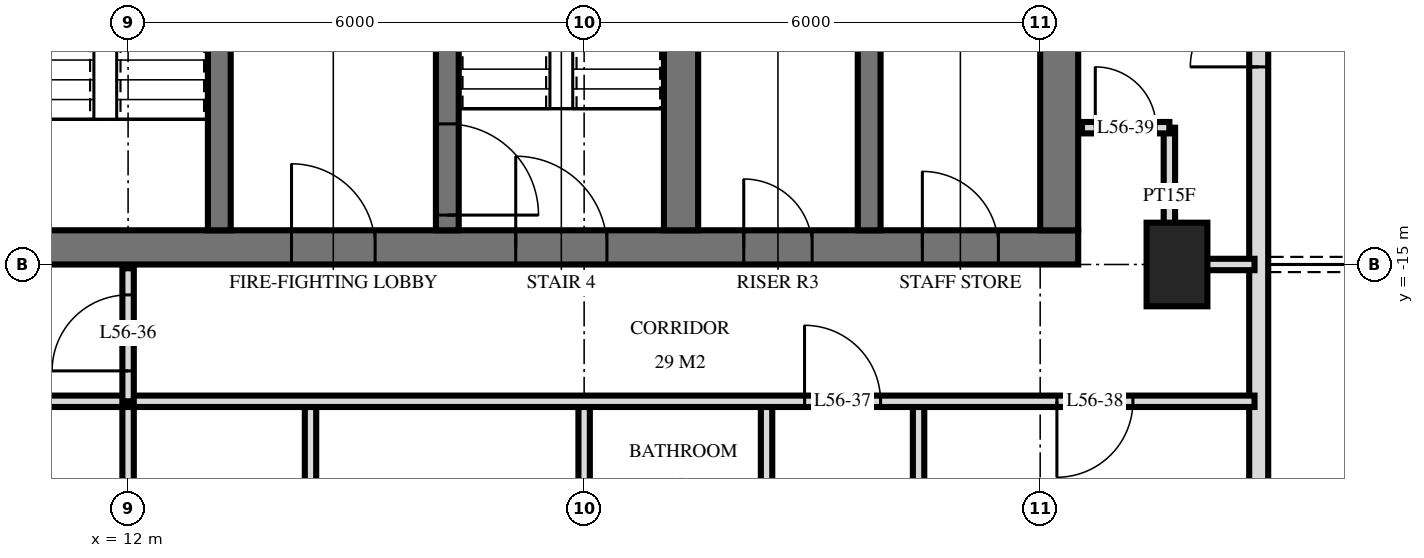
"""IFC4 building model, lengths in metres.
Left out: names, types, materials, properties, quantities, classifications, styles, units other than length and angle.
Written with IfcOpenShell. Run it as: python <this file> out.ifc"""

import sys

from ifc_helpers import new_model, si_unit, direction, frame, frame_2d, origin, origin_2d, place, context, subcontext, project, spatial, rectangle, extrude, element, fill, save


model = new_model("IFC4")
c1 = context("Model", 3, precision=1e-05, world=origin(), true_north=direction((0.0, 1.0)))
c2 = subcontext(c1, "Body", "Model", "MODEL_VIEW")
j1 = project(units=[si_unit("LENGTHUNIT", "METRE"), si_unit("PLANEANGLEUNIT", "RADIAN")], contexts=[c1])
p1 = place(None, origin())
s1 = spatial("IfcSite", under=j1, at=p1, CompositionType="ELEMENT")
p2 = place(p1, origin())
s2 = spatial("IfcBuilding", under=s1, at=p2, CompositionType="ELEMENT")
p3 = place(p2, frame((0.0, 0.0, 215.1)))
s3 = spatial("IfcBuildingStorey", under=s2, at=p3, CompositionType="ELEMENT", Elevation=215.1)
p4 = place(p3, frame((25.8, -15.0, 0.0), z_axis=(0.0, 0.0, 1.0), x_axis=(0.0, 1.0, 0.0)))
e1 = element("IfcColumn", 1, at=p4, inside=s3, PredefinedType="COLUMN", context=c2, shape_type="SweptSolid", body=[
    extrude(rectangle(XDim=1.1, YDim=0.8, at=origin_2d()), origin(), (0.0, 0.0, 1.0), 3.5),
])
p5 = place(p3, frame((10.0, -14.775, 0.0), z_axis=(0.0, 0.0, 1.0), x_axis=(1.0, 0.0, 0.0)))
e2 = element("IfcWall", 2, at=p5, inside=s3, PredefinedType="SHEAR", context=c2, shape_type="SweptSolid", body=[
    extrude(rectangle(XDim=14.5, YDim=0.45, at=frame_2d((7.25, 0.0))), origin(), (0.0, 0.0, 1.0), 3.5),
])
p6 = place(p5, frame((7.1, 0.0, 0.0)))
e3 = element("IfcOpeningElement", 3, at=p6, cuts=e2, PredefinedType="OPENING", context=c2, shape_type="SweptSolid", body=[
    extrude(rectangle(XDim=1.2, YDim=2.1, at=frame_2d((0.6, 1.05))), frame((0.0, 0.235, 0.0), z_axis=(0.0, -1.0, 0.0), x_axis=(1.0, 0.0, 0.0)), (0.0, 0.0, 1.0), 0.47),
])
p7 = place(p5, frame((4.15, 0.0, 0.0)))
e4 = element("IfcOpeningElement", 4, at=p7, cuts=e2, PredefinedType="OPENING", context=c2, shape_type="SweptSolid", body=[
    extrude(rectangle(XDim=1.1, YDim=2.1, at=frame_2d((0.55, 1.05))), frame((0.0, 0.235, 0.0), z_axis=(0.0, -1.0, 0.0), x_axis=(1.0, 0.0, 0.0)), (0.0, 0.0, 1.0), 0.47),
])
p8 = place(p5, frame((10.1, 0.0, 0.0)))
e5 = element("IfcOpeningElement", 5, at=p8, cuts=e2, PredefinedType="OPENING", context=c2, shape_type="SweptSolid", body=[
    extrude(rectangle(XDim=0.9, YDim=2.1, at=frame_2d((0.45, 1.05))), frame((0.0, 0.235, 0.0), z_axis=(0.0, -1.0, 0.0), x_axis=(1.0, 0.0, 0.0)), (0.0, 0.0, 1.0), 0.47),
])
p9 = place(p5, frame((12.45, 0.0, 0.0)))
e6 = element("IfcOpeningElement", 6, at=p9, cuts=e2, PredefinedType="OPENING", context=c2, shape_type="SweptSolid", body=[
    extrude(rectangle(XDim=1.0, YDim=2.1, at=frame_2d((0.5, 1.05))), frame((0.0, 0.235, 0.0), z_axis=(0.0, -1.0, 0.0), x_axis=(1.0, 0.0, 0.0)), (0.0, 0.0, 1.0), 0.47),
])
p10 = place(p3, frame((24.25, -14.55, 0.0), z_axis=(0.0, 0.0, 1.0), x_axis=(0.0, 1.0, 0.0)))
e7 = element("IfcWall", 7, at=p10, inside=s3, PredefinedType="SHEAR", context=c2, shape_type="SweptSolid", body=[
    extrude(rectangle(XDim=14.1, YDim=0.5, at=frame_2d((7.05, 0.0))), origin(), (0.0, 0.0, 1.0), 3.5),
])
p11 = place(p3, frame((13.2, -14.55, 0.0), z_axis=(0.0, 0.0, 1.0), x_axis=(0.0, 1.0, 0.0)))
e8 = element("IfcWall", 8, at=p11, inside=s3, PredefinedType="SHEAR", context=c2, shape_type="SweptSolid", body=[
    extrude(rectangle(XDim=5.4, YDim=0.3, at=frame_2d((2.7, 0.0))), origin(), (0.0, 0.0, 1.0), 3.5),
])
p12 = place(p11, frame((4.0, 0.0, 0.0)))
e9 = element("IfcOpeningElement", 9, at=p12, cuts=e8, PredefinedType="OPENING", context=c2, shape_type="SweptSolid", body=[
    extrude(rectangle(XDim=1.2, YDim=2.1, at=frame_2d((0.6, 1.05))), frame((0.0, 0.16, 0.0), z_axis=(0.0, -1.0, 0.0), x_axis=(1.0, 0.0, 0.0)), (0.0, 0.0, 1.0), 0.32),
])
p13 = place(p3, frame((16.2, -14.55, 0.0), z_axis=(0.0, 0.0, 1.0), x_axis=(0.0, 1.0, 0.0)))
e10 = element("IfcWall", 10, at=p13, inside=s3, PredefinedType="SHEAR", context=c2, shape_type="SweptSolid", body=[
    extrude(rectangle(XDim=5.4, YDim=0.3, at=frame_2d((2.7, 0.0))), origin(), (0.0, 0.0, 1.0), 3.5),
])
p14 = place(p13, frame((0.2, 0.0, 0.0)))
e11 = element("IfcOpeningElement", 11, at=p14, cuts=e10, PredefinedType="OPENING", context=c2, shape_type="SweptSolid", body=[
    extrude(rectangle(XDim=1.2, YDim=2.1, at=frame_2d((0.6, 1.05))), frame((0.0, 0.16, 0.0), z_axis=(0.0, -1.0, 0.0), x_axis=(1.0, 0.0, 0.0)), (0.0, 0.0, 1.0), 0.32),
])
p15 = place(p3, frame((19.275, -14.55, 0.0), z_axis=(0.0, 0.0, 1.0), x_axis=(0.0, 1.0, 0.0)))
e12 = element("IfcWall", 12, at=p15, inside=s3, PredefinedType="SHEAR", context=c2, shape_type="SweptSolid", body=[
    extrude(rectangle(XDim=5.4, YDim=0.45, at=frame_2d((2.7, 0.0))), origin(), (0.0, 0.0, 1.0), 3.5),
])
p16 = place(p3, frame((21.75, -14.55, 0.0), z_axis=(0.0, 0.0, 1.0), x_axis=(0.0, 1.0, 0.0)))
e13 = element("IfcWall", 13, at=p16, inside=s3, PredefinedType="SHEAR", context=c2, shape_type="SweptSolid", body=[
    extrude(rectangle(XDim=5.4, YDim=0.3, at=frame_2d((2.7, 0.0))), origin(), (0.0, 0.0, 1.0), 3.5),
])
p17 = place(p3, frame((26.875, -24.875, 0.0), z_axis=(0.0, 0.0, 1.0), x_axis=(0.0, 1.0, 0.0)))
e14 = element("IfcWall", 14, at=p17, inside=s3, PredefinedType="SOLIDWALL", context=c2, shape_type="SweptSolid", body=[
    extrude(rectangle(XDim=21.551, YDim=0.25, at=frame_2d((10.775, 0.0))), origin(), (0.0, 0.0, 1.0), 3.22),
])
p18 = place(p17, frame((0.575, 0.0, 0.0)))
e15 = element("IfcOpeningElement", 15, at=p18, cuts=e14, PredefinedType="OPENING", context=c2, shape_type="SweptSolid", body=[
    extrude(rectangle(XDim=1.8, YDim=2.4, at=frame_2d((0.9, 1.2))), frame((0.0, 0.135, 0.0), z_axis=(0.0, -1.0, 0.0), x_axis=(1.0, 0.0, 0.0)), (0.0, 0.0, 1.0), 0.27),
])
p19 = place(p17, frame((5.075, 0.0, 0.0)))
e16 = element("IfcOpeningElement", 16, at=p19, cuts=e14, PredefinedType="OPENING", context=c2, shape_type="SweptSolid", body=[
    extrude(rectangle(XDim=1.8, YDim=2.4, at=frame_2d((0.9, 1.2))), frame((0.0, 0.135, 0.0), z_axis=(0.0, -1.0, 0.0), x_axis=(1.0, 0.0, 0.0)), (0.0, 0.0, 1.0), 0.27),
])
p20 = place(p17, frame((12.475, 0.0, 0.0)))
e17 = element("IfcOpeningElement", 17, at=p20, cuts=e14, PredefinedType="OPENING", context=c2, shape_type="SweptSolid", body=[
    extrude(rectangle(XDim=1.8, YDim=2.4, at=frame_2d((0.9, 1.2))), frame((0.0, 0.135, 0.0), z_axis=(0.0, -1.0, 0.0), x_axis=(1.0, 0.0, 0.0)), (0.0, 0.0, 1.0), 0.27),
])
p21 = place(p3, frame((25.7, -15.0, 0.0), z_axis=(0.0, 0.0, 1.0), x_axis=(0.0, 1.0, 0.0)))
e18 = element("IfcWall", 18, at=p21, inside=s3, PredefinedType="PARTITIONING", context=c2, shape_type="SweptSolid", body=[
    extrude(rectangle(XDim=1.8, YDim=0.15, at=frame_2d((0.9, 0.0))), origin(), (0.0, 0.0, 1.0), 3.22),
])
p22 = place(p3, frame((22.4, -21.0, 0.0), z_axis=(0.0, 0.0, 1.0), x_axis=(0.0, 1.0, 0.0)))
e19 = element("IfcWall", 19, at=p22, inside=s3, PredefinedType="PARTITIONING", context=c2, shape_type="SweptSolid", body=[
    extrude(rectangle(XDim=4.2, YDim=0.15, at=frame_2d((2.1, 0.0))), origin(), (0.0, 0.0, 1.0), 3.22),
])
p23 = place(p3, frame((20.4, -21.0, 0.0), z_axis=(0.0, 0.0, 1.0), x_axis=(0.0, 1.0, 0.0)))
e20 = element("IfcWall", 20, at=p23, inside=s3, PredefinedType="PARTITIONING", context=c2, shape_type="SweptSolid", body=[
    extrude(rectangle(XDim=4.2, YDim=0.15, at=frame_2d((2.1, 0.0))), origin(), (0.0, 0.0, 1.0), 3.22),
])
p24 = place(p23, frame((1.6, 0.0, 0.0)))
e21 = element("IfcOpeningElement", 21, at=p24, cuts=e20, PredefinedType="OPENING", context=c2, shape_type="SweptSolid", body=[
    extrude(rectangle(XDim=1.0, YDim=2.1, at=frame_2d((0.5, 1.05))), frame((0.0, 0.085, 0.0), z_axis=(0.0, -1.0, 0.0), x_axis=(1.0, 0.0, 0.0)), (0.0, 0.0, 1.0), 0.17),
])
for number, where, z_axis, x_axis in (
    (22, (18.0, -21.0, 0.0), (0.0, 0.0, 1.0), (0.0, 1.0, 0.0)),
    (23, (14.4, -21.0, 0.0), (0.0, 0.0, 1.0), (0.0, 1.0, 0.0)),
):
    element("IfcWall", number, at=place(p3, frame(where, z_axis=z_axis, x_axis=x_axis)), inside=s3, PredefinedType="PARTITIONING", context=c2, shape_type="SweptSolid", body=[
        extrude(rectangle(XDim=4.2, YDim=0.15, at=frame_2d((2.1, 0.0))), origin(), (0.0, 0.0, 1.0), 3.22),
    ])
p25 = place(p3, frame((12.0, -16.8, 0.0), z_axis=(0.0, 0.0, 1.0), x_axis=(0.0, 1.0, 0.0)))
e24 = element("IfcWall", 24, at=p25, inside=s3, PredefinedType="PARTITIONING", context=c2, shape_type="SweptSolid", body=[
    extrude(rectangle(XDim=1.75, YDim=0.15, at=frame_2d((0.875, 0.0))), origin(), (0.0, 0.0, 1.0), 3.22),
])
p26 = place(p25, frame((0.4, 0.0, 0.0)))
e25 = element("IfcOpeningElement", 25, at=p26, cuts=e24, PredefinedType="OPENING", context=c2, shape_type="SweptSolid", body=[
    extrude(rectangle(XDim=1.0, YDim=2.1, at=frame_2d((0.5, 1.05))), frame((0.0, 0.085, 0.0), z_axis=(0.0, -1.0, 0.0), x_axis=(1.0, 0.0, 0.0)), (0.0, 0.0, 1.0), 0.17),
])
p27 = place(p3, frame((12.0, -29.22, 0.0), z_axis=(0.0, 0.0, 1.0), x_axis=(0.0, 1.0, 0.0)))
e26 = element("IfcWall", 26, at=p27, inside=s3, PredefinedType="PARTITIONING", context=c2, shape_type="SweptSolid", body=[
    extrude(rectangle(XDim=12.42, YDim=0.15, at=frame_2d((6.21, 0.0))), origin(), (0.0, 0.0, 1.0), 3.22),
])
p28 = place(p3, frame((-26.82, -16.8, 0.0), z_axis=(0.0, 0.0, 1.0), x_axis=(1.0, 0.0, 0.0)))
e27 = element("IfcWall", 27, at=p28, inside=s3, PredefinedType="PARTITIONING", context=c2, shape_type="SweptSolid", body=[
    extrude(rectangle(XDim=53.64, YDim=0.15, at=frame_2d((26.82, 0.0))), origin(), (0.0, 0.0, 1.0), 3.22),
])
p29 = place(p28, frame((11.17, 0.0, 0.0)))
e28 = element("IfcOpeningElement", 28, at=p29, cuts=e27, PredefinedType="OPENING", context=c2, shape_type="SweptSolid", body=[
    extrude(rectangle(XDim=1.0, YDim=2.1, at=frame_2d((0.5, 1.05))), frame((0.0, 0.085, 0.0), z_axis=(0.0, -1.0, 0.0), x_axis=(1.0, 0.0, 0.0)), (0.0, 0.0, 1.0), 0.17),
])
p30 = place(p28, frame((3.22, 0.0, 0.0)))
e29 = element("IfcOpeningElement", 29, at=p30, cuts=e27, PredefinedType="OPENING", context=c2, shape_type="SweptSolid", body=[
    extrude(rectangle(XDim=1.0, YDim=2.1, at=frame_2d((0.5, 1.05))), frame((0.0, 0.085, 0.0), z_axis=(0.0, -1.0, 0.0), x_axis=(1.0, 0.0, 0.0)), (0.0, 0.0, 1.0), 0.17),
])
p31 = place(p28, frame((5.02, 0.0, 0.0)))
e30 = element("IfcOpeningElement", 30, at=p31, cuts=e27, PredefinedType="OPENING", context=c2, shape_type="SweptSolid", body=[
    extrude(rectangle(XDim=1.0, YDim=2.1, at=frame_2d((0.5, 1.05))), frame((0.0, 0.085, 0.0), z_axis=(0.0, -1.0, 0.0), x_axis=(1.0, 0.0, 0.0)), (0.0, 0.0, 1.0), 0.17),
])
p32 = place(p28, frame((47.72, 0.0, 0.0)))
e31 = element("IfcOpeningElement", 31, at=p32, cuts=e27, PredefinedType="OPENING", context=c2, shape_type="SweptSolid", body=[
    extrude(rectangle(XDim=1.0, YDim=2.1, at=frame_2d((0.5, 1.05))), frame((0.0, 0.085, 0.0), z_axis=(0.0, -1.0, 0.0), x_axis=(1.0, 0.0, 0.0)), (0.0, 0.0, 1.0), 0.17),
])
p33 = place(p28, frame((51.04, 0.0, 0.0)))
e32 = element("IfcOpeningElement", 32, at=p33, cuts=e27, PredefinedType="OPENING", context=c2, shape_type="SweptSolid", body=[
    extrude(rectangle(XDim=1.0, YDim=2.1, at=frame_2d((0.5, 1.05))), frame((0.0, 0.085, 0.0), z_axis=(0.0, -1.0, 0.0), x_axis=(1.0, 0.0, 0.0)), (0.0, 0.0, 1.0), 0.17),
])
p34 = place(p28, frame((17.32, 0.0, 0.0)))
e33 = element("IfcOpeningElement", 33, at=p34, cuts=e27, PredefinedType="OPENING", context=c2, shape_type="SweptSolid", body=[
    extrude(rectangle(XDim=1.0, YDim=2.1, at=frame_2d((0.5, 1.05))), frame((0.0, 0.085, 0.0), z_axis=(0.0, -1.0, 0.0), x_axis=(1.0, 0.0, 0.0)), (0.0, 0.0, 1.0), 0.17),
])
p35 = place(p28, frame((26.32, 0.0, 0.0)))
e34 = element("IfcOpeningElement", 34, at=p35, cuts=e27, PredefinedType="OPENING", context=c2, shape_type="SweptSolid", body=[
    extrude(rectangle(XDim=1.0, YDim=2.1, at=frame_2d((0.5, 1.05))), frame((0.0, 0.085, 0.0), z_axis=(0.0, -1.0, 0.0), x_axis=(1.0, 0.0, 0.0)), (0.0, 0.0, 1.0), 0.17),
])
p36 = place(p28, frame((35.32, 0.0, 0.0)))
e35 = element("IfcOpeningElement", 35, at=p36, cuts=e27, PredefinedType="OPENING", context=c2, shape_type="SweptSolid", body=[
    extrude(rectangle(XDim=1.0, YDim=2.1, at=frame_2d((0.5, 1.05))), frame((0.0, 0.085, 0.0), z_axis=(0.0, -1.0, 0.0), x_axis=(1.0, 0.0, 0.0)), (0.0, 0.0, 1.0), 0.17),
])
p37 = place(p3, frame((25.7, -15.0, 0.0), z_axis=(0.0, 0.0, 1.0), x_axis=(1.0, 0.0, 0.0)))
e36 = element("IfcWall", 36, at=p37, inside=s3, PredefinedType="PARTITIONING", context=c2, shape_type="SweptSolid", body=[
    extrude(rectangle(XDim=1.12, YDim=0.15, at=frame_2d((0.56, 0.0))), origin(), (0.0, 0.0, 1.0), 3.22),
])
p38 = place(p3, frame((24.55, -13.2, 0.0), z_axis=(0.0, 0.0, 1.0), x_axis=(1.0, 0.0, 0.0)))
e37 = element("IfcWall", 37, at=p38, inside=s3, PredefinedType="PARTITIONING", context=c2, shape_type="SweptSolid", body=[
    extrude(rectangle(XDim=1.15, YDim=0.15, at=frame_2d((0.575, 0.0))), origin(), (0.0, 0.0, 1.0), 3.22),
])
p39 = place(p38, frame((0.175, 0.0, 0.0)))
e38 = element("IfcOpeningElement", 38, at=p39, cuts=e37, PredefinedType="OPENING", context=c2, shape_type="SweptSolid", body=[
    extrude(rectangle(XDim=0.8, YDim=2.1, at=frame_2d((0.4, 1.05))), frame((0.0, 0.085, 0.0), z_axis=(0.0, -1.0, 0.0), x_axis=(1.0, 0.0, 0.0)), (0.0, 0.0, 1.0), 0.17),
])
p40 = place(p20, origin())
e39 = element("IfcDoor", 39, at=p40, inside=s3, OperationType="DOUBLE_DOOR_SINGLE_SWING", PredefinedType="DOOR", context=c2, shape_type="SweptSolid", body=[
    extrude(rectangle(XDim=1.8, YDim=2.4, at=frame_2d((0.9, 1.2))), frame((0.0, 0.025, 0.0), z_axis=(0.0, -1.0, 0.0), x_axis=(1.0, 0.0, 0.0)), (0.0, 0.0, 1.0), 0.05),
])
fill(e17, e39)
p41 = place(p6, origin())
e40 = element("IfcDoor", 40, at=p41, inside=s3, OperationType="SINGLE_SWING_RIGHT", PredefinedType="DOOR", context=c2, shape_type="SweptSolid", body=[
    extrude(rectangle(XDim=1.2, YDim=2.1, at=frame_2d((0.6, 1.05))), frame((0.0, 0.025, 0.0), z_axis=(0.0, -1.0, 0.0), x_axis=(1.0, 0.0, 0.0)), (0.0, 0.0, 1.0), 0.05),
])
fill(e3, e40)
p42 = place(p7, origin())
e41 = element("IfcDoor", 41, at=p42, inside=s3, OperationType="SINGLE_SWING_RIGHT", PredefinedType="DOOR", context=c2, shape_type="SweptSolid", body=[
    extrude(rectangle(XDim=1.1, YDim=2.1, at=frame_2d((0.55, 1.05))), frame((0.0, 0.025, 0.0), z_axis=(0.0, -1.0, 0.0), x_axis=(1.0, 0.0, 0.0)), (0.0, 0.0, 1.0), 0.05),
])
fill(e4, e41)
p43 = place(p8, origin())
e42 = element("IfcDoor", 42, at=p43, inside=s3, OperationType="SINGLE_SWING_RIGHT", PredefinedType="DOOR", context=c2, shape_type="SweptSolid", body=[
    extrude(rectangle(XDim=0.9, YDim=2.1, at=frame_2d((0.45, 1.05))), frame((0.0, 0.025, 0.0), z_axis=(0.0, -1.0, 0.0), x_axis=(1.0, 0.0, 0.0)), (0.0, 0.0, 1.0), 0.05),
])
fill(e5, e42)
p44 = place(p9, origin())
e43 = element("IfcDoor", 43, at=p44, inside=s3, OperationType="SINGLE_SWING_RIGHT", PredefinedType="DOOR", context=c2, shape_type="SweptSolid", body=[
    extrude(rectangle(XDim=1.0, YDim=2.1, at=frame_2d((0.5, 1.05))), frame((0.0, 0.025, 0.0), z_axis=(0.0, -1.0, 0.0), x_axis=(1.0, 0.0, 0.0)), (0.0, 0.0, 1.0), 0.05),
])
fill(e6, e43)
p45 = place(p14, frame((0.6, 0.0, 0.0), z_axis=(0.0, 0.0, 1.0), x_axis=(-1.0, 0.0, 0.0)))
e44 = element("IfcDoor", 44, at=p45, inside=s3, OperationType="SINGLE_SWING_LEFT", PredefinedType="DOOR", context=c2, shape_type="SweptSolid", body=[
    extrude(rectangle(XDim=1.2, YDim=2.1, at=frame_2d((0.0, 1.05))), frame((0.0, -0.025, 0.0), z_axis=(0.0, 1.0, 0.0), x_axis=(-1.0, 0.0, 0.0)), (0.0, 0.0, 1.0), 0.05),
])
fill(e11, e44)
p46 = place(p26, origin())
e45 = element("IfcDoor", 45, at=p46, inside=s3, OperationType="SINGLE_SWING_RIGHT", PredefinedType="DOOR", context=c2, shape_type="SweptSolid", body=[
    extrude(rectangle(XDim=1.0, YDim=2.1, at=frame_2d((0.5, 1.05))), frame((0.0, 0.025, 0.0), z_axis=(0.0, -1.0, 0.0), x_axis=(1.0, 0.0, 0.0)), (0.0, 0.0, 1.0), 0.05),
])
fill(e25, e45)
p47 = place(p32, origin())
e46 = element("IfcDoor", 46, at=p47, inside=s3, OperationType="SINGLE_SWING_RIGHT", PredefinedType="DOOR", context=c2, shape_type="SweptSolid", body=[
    extrude(rectangle(XDim=1.0, YDim=2.1, at=frame_2d((0.5, 1.05))), frame((0.0, 0.025, 0.0), z_axis=(0.0, -1.0, 0.0), x_axis=(1.0, 0.0, 0.0)), (0.0, 0.0, 1.0), 0.05),
])
fill(e31, e46)
p48 = place(p33, frame((0.5, 0.0, 0.0), z_axis=(0.0, 0.0, 1.0), x_axis=(-1.0, 0.0, 0.0)))
e47 = element("IfcDoor", 47, at=p48, inside=s3, OperationType="SINGLE_SWING_LEFT", PredefinedType="DOOR", context=c2, shape_type="SweptSolid", body=[
    extrude(rectangle(XDim=1.0, YDim=2.1, at=frame_2d((0.0, 1.05))), frame((0.0, -0.025, 0.0), z_axis=(0.0, 1.0, 0.0), x_axis=(-1.0, 0.0, 0.0)), (0.0, 0.0, 1.0), 0.05),
])
fill(e32, e47)
p49 = place(p39, origin())
e48 = element("IfcDoor", 48, at=p49, inside=s3, OperationType="SINGLE_SWING_RIGHT", PredefinedType="DOOR", context=c2, shape_type="SweptSolid", body=[
    extrude(rectangle(XDim=0.8, YDim=2.1, at=frame_2d((0.4, 1.05))), frame((0.0, 0.025, 0.0), z_axis=(0.0, -1.0, 0.0), x_axis=(1.0, 0.0, 0.0)), (0.0, 0.0, 1.0), 0.05),
])
fill(e38, e48)
save(model, sys.argv[1])
